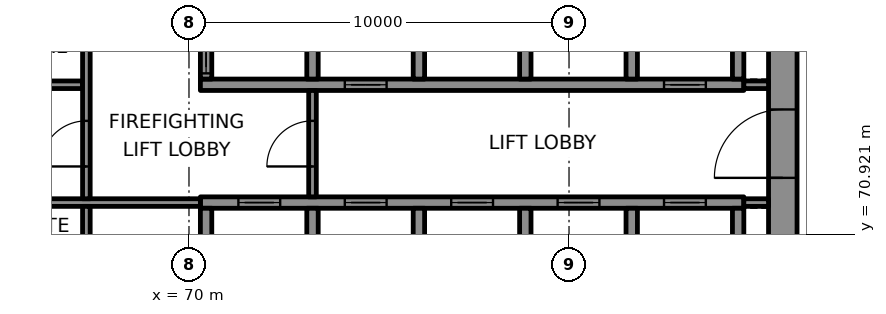
"""IFC4 building model, lengths in metres.
Left out: names, types, materials, properties, quantities, classifications, styles, units other than length and angle.
Written with IfcOpenShell. Run it as: python <this file> out.ifc"""

import sys

from ifc_helpers import new_model, si_unit, direction, frame, frame_2d, origin, place, context, subcontext, project, spatial, rectangle, extrude, element, fill, save


model = new_model("IFC4")
c1 = context("Model", 3, precision=1e-05, world=origin(), true_north=direction((0.0, 1.0)))
c2 = subcontext(c1, "Body", "Model", "MODEL_VIEW")
j1 = project(units=[si_unit("LENGTHUNIT", "METRE"), si_unit("PLANEANGLEUNIT", "RADIAN")], contexts=[c1])
p1 = place(None, origin())
s1 = spatial("IfcSite", under=j1, at=p1, CompositionType="ELEMENT")
p2 = place(p1, origin())
s2 = spatial("IfcBuilding", under=s1, at=p2, CompositionType="ELEMENT")
p3 = place(p2, frame((0.0, 0.0, 210.4)))
s3 = spatial("IfcBuildingStorey", under=s2, at=p3, CompositionType="ELEMENT", Elevation=210.4)
p4 = place(p3, frame((85.625, 67.75, 0.0), z_axis=(0.0, 0.0, 1.0), x_axis=(0.0, 1.0, 0.0)))
e1 = element("IfcWall", 1, at=p4, inside=s3, PredefinedType="SHEAR", context=c2, shape_type="SweptSolid", body=[
    extrude(rectangle(XDim=14.5, YDim=0.75, at=frame_2d((7.25, 0.0))), origin(), (0.0, 0.0, 1.0), 3.7),
])
p5 = place(p4, frame((4.65, 0.0, 0.0)))
e2 = element("IfcOpeningElement", 2, at=p5, cuts=e1, PredefinedType="OPENING", context=c2, shape_type="SweptSolid", body=[
    extrude(rectangle(XDim=1.8, YDim=2.1, at=frame_2d((0.9, 1.05))), frame((0.0, 0.385, 0.0), z_axis=(0.0, -1.0, 0.0), x_axis=(1.0, 0.0, 0.0)), (0.0, 0.0, 1.0), 0.77),
])
p6 = place(p4, frame((11.8, 0.0, 0.0)))
e3 = element("IfcOpeningElement", 3, at=p6, cuts=e1, PredefinedType="OPENING", context=c2, shape_type="SweptSolid", body=[
    extrude(rectangle(XDim=0.9, YDim=2.1, at=frame_2d((0.45, 1.05))), frame((0.0, 0.385, 0.0), z_axis=(0.0, -1.0, 0.0), x_axis=(1.0, 0.0, 0.0)), (0.0, 0.0, 1.0), 0.77),
])
p7 = place(p3, frame((70.3, 71.75, 0.0), z_axis=(0.0, 0.0, 1.0), x_axis=(1.0, 0.0, 0.0)))
e4 = element("IfcWall", 4, at=p7, inside=s3, PredefinedType="SHEAR", context=c2, shape_type="SweptSolid", body=[
    extrude(rectangle(XDim=14.3, YDim=0.3, at=frame_2d((7.15, 0.0))), origin(), (0.0, 0.0, 1.0), 3.7),
])
p8 = place(p7, frame((1.0, 0.0, 0.0)))
e5 = element("IfcOpeningElement", 5, at=p8, cuts=e4, PredefinedType="OPENING", context=c2, shape_type="SweptSolid", body=[
    extrude(rectangle(XDim=1.1, YDim=2.1, at=frame_2d((0.55, 1.05))), frame((0.0, 0.16, 0.0), z_axis=(0.0, -1.0, 0.0), x_axis=(1.0, 0.0, 0.0)), (0.0, 0.0, 1.0), 0.32),
])
p9 = place(p7, frame((3.8, 0.0, 0.0)))
e6 = element("IfcOpeningElement", 6, at=p9, cuts=e4, PredefinedType="OPENING", context=c2, shape_type="SweptSolid", body=[
    extrude(rectangle(XDim=1.1, YDim=2.1, at=frame_2d((0.55, 1.05))), frame((0.0, 0.16, 0.0), z_axis=(0.0, -1.0, 0.0), x_axis=(1.0, 0.0, 0.0)), (0.0, 0.0, 1.0), 0.32),
])
p10 = place(p7, frame((6.6, 0.0, 0.0)))
e7 = element("IfcOpeningElement", 7, at=p10, cuts=e4, PredefinedType="OPENING", context=c2, shape_type="SweptSolid", body=[
    extrude(rectangle(XDim=1.1, YDim=2.1, at=frame_2d((0.55, 1.05))), frame((0.0, 0.16, 0.0), z_axis=(0.0, -1.0, 0.0), x_axis=(1.0, 0.0, 0.0)), (0.0, 0.0, 1.0), 0.32),
])
p11 = place(p7, frame((9.4, 0.0, 0.0)))
e8 = element("IfcOpeningElement", 8, at=p11, cuts=e4, PredefinedType="OPENING", context=c2, shape_type="SweptSolid", body=[
    extrude(rectangle(XDim=1.1, YDim=2.1, at=frame_2d((0.55, 1.05))), frame((0.0, 0.16, 0.0), z_axis=(0.0, -1.0, 0.0), x_axis=(1.0, 0.0, 0.0)), (0.0, 0.0, 1.0), 0.32),
])
p12 = place(p7, frame((12.2, 0.0, 0.0)))
e9 = element("IfcOpeningElement", 9, at=p12, cuts=e4, PredefinedType="OPENING", context=c2, shape_type="SweptSolid", body=[
    extrude(rectangle(XDim=1.1, YDim=2.1, at=frame_2d((0.55, 1.05))), frame((0.0, 0.16, 0.0), z_axis=(0.0, -1.0, 0.0), x_axis=(1.0, 0.0, 0.0)), (0.0, 0.0, 1.0), 0.32),
])
p13 = place(p3, frame((70.3, 74.85, 0.0), z_axis=(0.0, 0.0, 1.0), x_axis=(1.0, 0.0, 0.0)))
e10 = element("IfcWall", 10, at=p13, inside=s3, PredefinedType="SHEAR", context=c2, shape_type="SweptSolid", body=[
    extrude(rectangle(XDim=14.3, YDim=0.3, at=frame_2d((7.15, 0.0))), origin(), (0.0, 0.0, 1.0), 3.7),
])
p14 = place(p13, frame((3.8, 0.0, 0.0)))
e11 = element("IfcOpeningElement", 11, at=p14, cuts=e10, PredefinedType="OPENING", context=c2, shape_type="SweptSolid", body=[
    extrude(rectangle(XDim=1.1, YDim=2.1, at=frame_2d((0.55, 1.05))), frame((0.0, 0.16, 0.0), z_axis=(0.0, -1.0, 0.0), x_axis=(1.0, 0.0, 0.0)), (0.0, 0.0, 1.0), 0.32),
])
p15 = place(p13, frame((12.2, 0.0, 0.0)))
e12 = element("IfcOpeningElement", 12, at=p15, cuts=e10, PredefinedType="OPENING", context=c2, shape_type="SweptSolid", body=[
    extrude(rectangle(XDim=1.1, YDim=2.1, at=frame_2d((0.55, 1.05))), frame((0.0, 0.16, 0.0), z_axis=(0.0, -1.0, 0.0), x_axis=(1.0, 0.0, 0.0)), (0.0, 0.0, 1.0), 0.32),
])
p16 = place(p3, frame((70.45, 69.0, 0.0), z_axis=(0.0, 0.0, 1.0), x_axis=(0.0, 1.0, 0.0)))
e13 = element("IfcWall", 13, at=p16, inside=s3, PredefinedType="SHEAR", context=c2, shape_type="SweptSolid", body=[
    extrude(rectangle(XDim=2.6, YDim=0.3, at=frame_2d((1.3, 0.0))), origin(), (0.0, 0.0, 1.0), 3.7),
])
p17 = place(p3, frame((70.45, 75.0, 0.0), z_axis=(0.0, 0.0, 1.0), x_axis=(0.0, 1.0, 0.0)))
e14 = element("IfcWall", 14, at=p17, inside=s3, PredefinedType="SHEAR", context=c2, shape_type="SweptSolid", body=[
    extrude(rectangle(XDim=2.6, YDim=0.3, at=frame_2d((1.3, 0.0))), origin(), (0.0, 0.0, 1.0), 3.7),
])
p18 = place(p17, frame((0.15, 0.0, 0.0)))
e15 = element("IfcOpeningElement", 15, at=p18, cuts=e14, PredefinedType="OPENING", context=c2, shape_type="SweptSolid", body=[
    extrude(rectangle(XDim=1.1, YDim=2.1, at=frame_2d((0.55, 1.05))), frame((0.0, 0.16, 0.0), z_axis=(0.0, -1.0, 0.0), x_axis=(1.0, 0.0, 0.0)), (0.0, 0.0, 1.0), 0.32),
])
for number, where, z_axis, x_axis in (
    (16, (73.25, 69.0, 0.0), (0.0, 0.0, 1.0), (0.0, 1.0, 0.0)),
    (17, (73.25, 75.0, 0.0), (0.0, 0.0, 1.0), (0.0, 1.0, 0.0)),
    (18, (76.05, 69.0, 0.0), (0.0, 0.0, 1.0), (0.0, 1.0, 0.0)),
    (19, (76.05, 75.0, 0.0), (0.0, 0.0, 1.0), (0.0, 1.0, 0.0)),
    (20, (78.85, 69.0, 0.0), (0.0, 0.0, 1.0), (0.0, 1.0, 0.0)),
    (21, (78.85, 75.0, 0.0), (0.0, 0.0, 1.0), (0.0, 1.0, 0.0)),
    (22, (81.65, 69.0, 0.0), (0.0, 0.0, 1.0), (0.0, 1.0, 0.0)),
    (23, (81.65, 75.0, 0.0), (0.0, 0.0, 1.0), (0.0, 1.0, 0.0)),
    (24, (84.45, 69.0, 0.0), (0.0, 0.0, 1.0), (0.0, 1.0, 0.0)),
    (25, (84.45, 75.0, 0.0), (0.0, 0.0, 1.0), (0.0, 1.0, 0.0)),
):
    element("IfcWall", number, at=place(p3, frame(where, z_axis=z_axis, x_axis=x_axis)), inside=s3, PredefinedType="SHEAR", context=c2, shape_type="SweptSolid", body=[
        extrude(rectangle(XDim=2.6, YDim=0.3, at=frame_2d((1.3, 0.0))), origin(), (0.0, 0.0, 1.0), 3.7),
    ])
p19 = place(p3, frame((64.75, 71.75, 0.0), z_axis=(0.0, 0.0, 1.0), x_axis=(1.0, 0.0, 0.0)))
e26 = element("IfcWall", 26, at=p19, inside=s3, PredefinedType="PARTITIONING", context=c2, shape_type="SweptSolid", body=[
    extrude(rectangle(XDim=5.55, YDim=0.2, at=frame_2d((2.775, 0.0))), origin(), (0.0, 0.0, 1.0), 3.7),
])
p20 = place(p3, frame((84.6, 71.75, 0.0), z_axis=(0.0, 0.0, 1.0), x_axis=(1.0, 0.0, 0.0)))
e27 = element("IfcWall", 27, at=p20, inside=s3, PredefinedType="PARTITIONING", context=c2, shape_type="SweptSolid", body=[
    extrude(rectangle(XDim=0.65, YDim=0.2, at=frame_2d((0.325, 0.0))), origin(), (0.0, 0.0, 1.0), 3.7),
])
p21 = place(p3, frame((64.75, 74.85, 0.0), z_axis=(0.0, 0.0, 1.0), x_axis=(1.0, 0.0, 0.0)))
e28 = element("IfcWall", 28, at=p21, inside=s3, PredefinedType="PARTITIONING", context=c2, shape_type="SweptSolid", body=[
    extrude(rectangle(XDim=2.45, YDim=0.2, at=frame_2d((1.225, 0.0))), origin(), (0.0, 0.0, 1.0), 3.7),
])
p22 = place(p3, frame((84.6, 74.85, 0.0), z_axis=(0.0, 0.0, 1.0), x_axis=(1.0, 0.0, 0.0)))
e29 = element("IfcWall", 29, at=p22, inside=s3, PredefinedType="PARTITIONING", context=c2, shape_type="SweptSolid", body=[
    extrude(rectangle(XDim=0.65, YDim=0.2, at=frame_2d((0.325, 0.0))), origin(), (0.0, 0.0, 1.0), 3.7),
])
p23 = place(p3, frame((67.3, 67.75, 0.0), z_axis=(0.0, 0.0, 1.0), x_axis=(0.0, 1.0, 0.0)))
e30 = element("IfcWall", 30, at=p23, inside=s3, PredefinedType="PARTITIONING", context=c2, shape_type="SweptSolid", body=[
    extrude(rectangle(XDim=3.9, YDim=0.2, at=frame_2d((1.95, 0.0))), origin(), (0.0, 0.0, 1.0), 3.7),
])
p24 = place(p3, frame((67.3, 71.85, 0.0), z_axis=(0.0, 0.0, 1.0), x_axis=(0.0, 1.0, 0.0)))
e31 = element("IfcWall", 31, at=p24, inside=s3, PredefinedType="PARTITIONING", context=c2, shape_type="SweptSolid", body=[
    extrude(rectangle(XDim=5.75, YDim=0.2, at=frame_2d((2.875, 0.0))), origin(), (0.0, 0.0, 1.0), 3.7),
])
p25 = place(p24, frame((0.85, 0.0, 0.0)))
e32 = element("IfcOpeningElement", 32, at=p25, cuts=e31, PredefinedType="OPENING", context=c2, shape_type="SweptSolid", body=[
    extrude(rectangle(XDim=1.2, YDim=2.1, at=frame_2d((0.6, 1.05))), frame((0.0, 0.11, 0.0), z_axis=(0.0, -1.0, 0.0), x_axis=(1.0, 0.0, 0.0)), (0.0, 0.0, 1.0), 0.22),
])
p26 = place(p3, frame((73.25, 71.9, 0.0), z_axis=(0.0, 0.0, 1.0), x_axis=(0.0, 1.0, 0.0)))
e33 = element("IfcWall", 33, at=p26, inside=s3, PredefinedType="PARTITIONING", context=c2, shape_type="SweptSolid", body=[
    extrude(rectangle(XDim=2.8, YDim=0.2, at=frame_2d((1.4, 0.0))), origin(), (0.0, 0.0, 1.0), 3.7),
])
p27 = place(p26, frame((0.8, 0.0, 0.0)))
e34 = element("IfcOpeningElement", 34, at=p27, cuts=e33, PredefinedType="OPENING", context=c2, shape_type="SweptSolid", body=[
    extrude(rectangle(XDim=1.2, YDim=2.1, at=frame_2d((0.6, 1.05))), frame((0.0, 0.11, 0.0), z_axis=(0.0, -1.0, 0.0), x_axis=(1.0, 0.0, 0.0)), (0.0, 0.0, 1.0), 0.22),
])
p28 = place(p8, origin())
e35 = element("IfcDoor", 35, at=p28, inside=s3, OperationType="DOUBLE_DOOR_SLIDING", PredefinedType="DOOR", context=c2, shape_type="SweptSolid", body=[
    extrude(rectangle(XDim=1.1, YDim=2.1, at=frame_2d((0.55, 1.05))), frame((0.0, 0.025, 0.0), z_axis=(0.0, -1.0, 0.0), x_axis=(1.0, 0.0, 0.0)), (0.0, 0.0, 1.0), 0.05),
])
fill(e5, e35)
p29 = place(p9, origin())
e36 = element("IfcDoor", 36, at=p29, inside=s3, OperationType="DOUBLE_DOOR_SLIDING", PredefinedType="DOOR", context=c2, shape_type="SweptSolid", body=[
    extrude(rectangle(XDim=1.1, YDim=2.1, at=frame_2d((0.55, 1.05))), frame((0.0, 0.025, 0.0), z_axis=(0.0, -1.0, 0.0), x_axis=(1.0, 0.0, 0.0)), (0.0, 0.0, 1.0), 0.05),
])
fill(e6, e36)
p30 = place(p10, origin())
e37 = element("IfcDoor", 37, at=p30, inside=s3, OperationType="DOUBLE_DOOR_SLIDING", PredefinedType="DOOR", context=c2, shape_type="SweptSolid", body=[
    extrude(rectangle(XDim=1.1, YDim=2.1, at=frame_2d((0.55, 1.05))), frame((0.0, 0.025, 0.0), z_axis=(0.0, -1.0, 0.0), x_axis=(1.0, 0.0, 0.0)), (0.0, 0.0, 1.0), 0.05),
])
fill(e7, e37)
p31 = place(p11, origin())
e38 = element("IfcDoor", 38, at=p31, inside=s3, OperationType="DOUBLE_DOOR_SLIDING", PredefinedType="DOOR", context=c2, shape_type="SweptSolid", body=[
    extrude(rectangle(XDim=1.1, YDim=2.1, at=frame_2d((0.55, 1.05))), frame((0.0, 0.025, 0.0), z_axis=(0.0, -1.0, 0.0), x_axis=(1.0, 0.0, 0.0)), (0.0, 0.0, 1.0), 0.05),
])
fill(e8, e38)
p32 = place(p12, origin())
e39 = element("IfcDoor", 39, at=p32, inside=s3, OperationType="DOUBLE_DOOR_SLIDING", PredefinedType="DOOR", context=c2, shape_type="SweptSolid", body=[
    extrude(rectangle(XDim=1.1, YDim=2.1, at=frame_2d((0.55, 1.05))), frame((0.0, 0.025, 0.0), z_axis=(0.0, -1.0, 0.0), x_axis=(1.0, 0.0, 0.0)), (0.0, 0.0, 1.0), 0.05),
])
fill(e9, e39)
p33 = place(p18, origin())
e40 = element("IfcDoor", 40, at=p33, inside=s3, OperationType="DOUBLE_DOOR_SLIDING", PredefinedType="DOOR", context=c2, shape_type="SweptSolid", body=[
    extrude(rectangle(XDim=1.1, YDim=2.1, at=frame_2d((0.55, 1.05))), frame((0.0, 0.025, 0.0), z_axis=(0.0, -1.0, 0.0), x_axis=(1.0, 0.0, 0.0)), (0.0, 0.0, 1.0), 0.05),
])
fill(e15, e40)
p34 = place(p14, origin())
e41 = element("IfcDoor", 41, at=p34, inside=s3, OperationType="DOUBLE_DOOR_SLIDING", PredefinedType="DOOR", context=c2, shape_type="SweptSolid", body=[
    extrude(rectangle(XDim=1.1, YDim=2.1, at=frame_2d((0.55, 1.05))), frame((0.0, 0.025, 0.0), z_axis=(0.0, -1.0, 0.0), x_axis=(1.0, 0.0, 0.0)), (0.0, 0.0, 1.0), 0.05),
])
fill(e11, e41)
p35 = place(p15, origin())
e42 = element("IfcDoor", 42, at=p35, inside=s3, OperationType="DOUBLE_DOOR_SLIDING", PredefinedType="DOOR", context=c2, shape_type="SweptSolid", body=[
    extrude(rectangle(XDim=1.1, YDim=2.1, at=frame_2d((0.55, 1.05))), frame((0.0, 0.025, 0.0), z_axis=(0.0, -1.0, 0.0), x_axis=(1.0, 0.0, 0.0)), (0.0, 0.0, 1.0), 0.05),
])
fill(e12, e42)
p36 = place(p27, origin())
e43 = element("IfcDoor", 43, at=p36, inside=s3, OperationType="SINGLE_SWING_LEFT", PredefinedType="DOOR", context=c2, shape_type="SweptSolid", body=[
    extrude(rectangle(XDim=1.2, YDim=2.1, at=frame_2d((0.6, 1.05))), frame((0.0, 0.025, 0.0), z_axis=(0.0, -1.0, 0.0), x_axis=(1.0, 0.0, 0.0)), (0.0, 0.0, 1.0), 0.05),
])
fill(e34, e43)
p37 = place(p25, origin())
e44 = element("IfcDoor", 44, at=p37, inside=s3, OperationType="SINGLE_SWING_RIGHT", PredefinedType="DOOR", context=c2, shape_type="SweptSolid", body=[
    extrude(rectangle(XDim=1.2, YDim=2.1, at=frame_2d((0.6, 1.05))), frame((0.0, 0.025, 0.0), z_axis=(0.0, -1.0, 0.0), x_axis=(1.0, 0.0, 0.0)), (0.0, 0.0, 1.0), 0.05),
])
fill(e32, e44)
p38 = place(p5, origin())
e45 = element("IfcDoor", 45, at=p38, inside=s3, OperationType="SINGLE_SWING_RIGHT", PredefinedType="DOOR", context=c2, shape_type="SweptSolid", body=[
    extrude(rectangle(XDim=1.8, YDim=2.1, at=frame_2d((0.9, 1.05))), frame((0.0, 0.095, 0.0), z_axis=(0.0, -1.0, 0.0), x_axis=(1.0, 0.0, 0.0)), (0.0, 0.0, 1.0), 0.19),
])
fill(e2, e45)
save(model, sys.argv[1])
